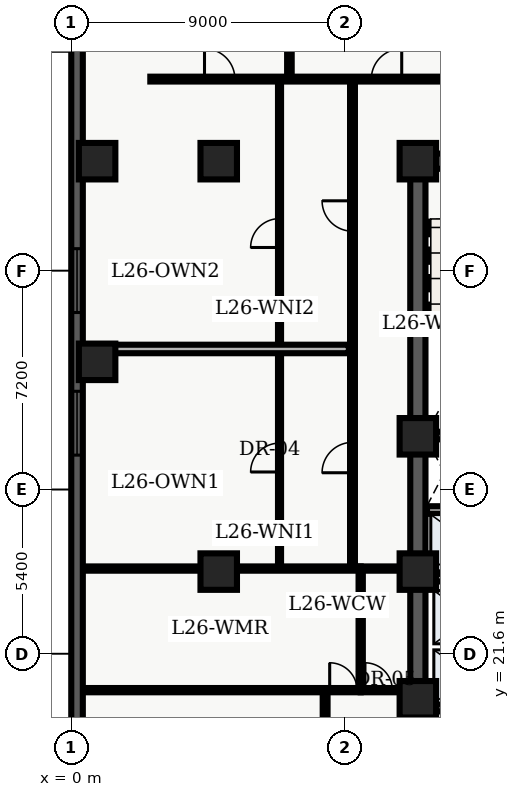
"""IFC4 building model, lengths in metres.
Left out: names, types, materials, properties, quantities, classifications, styles, units other than length and angle.
Written with IfcOpenShell. Run it as: python <this file> out.ifc"""

import sys

from ifc_helpers import new_model, entity, si_unit, converted_unit, direction, frame, origin_with_axes, origin_2d_with_axis, place, context, subcontext, project, spatial, polyline, rectangle, outline, extrude, element, fill, save


model = new_model("IFC4")
c1 = context("Model", 3, precision=1e-05, world=origin_with_axes(), true_north=direction((0.0, 1.0)))
c2 = subcontext(c1, "Body", "Model", "MODEL_VIEW")
j1 = project(units=[si_unit("LENGTHUNIT", "METRE"), converted_unit("PLANEANGLEUNIT", "DEGREE", entity("IfcPlaneAngleMeasure", 0.017), si_unit("PLANEANGLEUNIT", "RADIAN"), dimensions=[0, 0, 0, 0, 0, 0, 0])], contexts=[c1])
p1 = place(None, origin_with_axes())
s1 = spatial("IfcSite", under=j1, at=p1, CompositionType="ELEMENT")
p2 = place(p1, origin_with_axes())
s2 = spatial("IfcBuilding", under=s1, at=p2, CompositionType="ELEMENT")
p3 = place(p2, frame((0.0, 0.0, 108.6), z_axis=(0.0, 0.0, 1.0), x_axis=(1.0, 0.0, 0.0)))
s3 = spatial("IfcBuildingStorey", under=s2, at=p3, CompositionType="ELEMENT", Elevation=108.6)
p4 = place(p3, frame((11.4, 10.8, 0.0), z_axis=(0.0, 0.0, 1.0), x_axis=(0.0, 1.0, 0.0)))
e1 = element("IfcWall", 1, at=p4, inside=s3, PredefinedType="SHEAR", context=c2, shape_type="SweptSolid", body=[
    extrude(outline(polyline([(0.0, -0.25), (27.0, -0.25), (27.0, 0.25), (0.0, 0.25), (0.0, -0.25)])), origin_with_axes(), (0.0, 0.0, 1.0), 3.66),
])
p5 = place(p3, frame((11.4, 37.8, 0.0), z_axis=(0.0, 0.0, 1.0), x_axis=(1.0, 0.0, 0.0)))
e2 = element("IfcWall", 2, at=p5, inside=s3, PredefinedType="SHEAR", context=c2, shape_type="SweptSolid", body=[
    extrude(outline(polyline([(0.0, -0.25), (7.2, -0.25), (7.2, 0.25), (0.0, 0.25), (0.0, -0.25)])), origin_with_axes(), (0.0, 0.0, 1.0), 3.66),
])
p6 = place(p5, frame((2.625, 0.0, 0.0), z_axis=(0.0, 0.0, 1.0), x_axis=(1.0, 0.0, 0.0)))
e3 = element("IfcOpeningElement", 3, at=p6, cuts=e2, PredefinedType="OPENING", context=c2, shape_type="SweptSolid", body=[
    extrude(rectangle(XDim=1.05, YDim=0.52, at=origin_2d_with_axis()), origin_with_axes(), (0.0, 0.0, 1.0), 2.15),
])
for number, where, z_axis, x_axis in (
    (4, (11.65, 19.825, 0.0), (0.0, 0.0, 1.0), (1.0, 0.0, 0.0)),
    (5, (11.65, 28.775, 0.0), (0.0, 0.0, 1.0), (1.0, 0.0, 0.0)),
):
    element("IfcWall", number, at=place(p3, frame(where, z_axis=z_axis, x_axis=x_axis)), inside=s3, PredefinedType="SHEAR", context=c2, shape_type="SweptSolid", body=[
        extrude(outline(polyline([(0.0, -0.125), (6.7, -0.125), (6.7, 0.125), (0.0, 0.125), (0.0, -0.125)])), origin_with_axes(), (0.0, 0.0, 1.0), 3.66),
    ])
p7 = place(p3, frame((11.7, 24.1, 0.0), z_axis=(0.0, 0.0, 1.0), x_axis=(1.0, 0.0, 0.0)))
e6 = element("IfcWall", 6, at=p7, inside=s3, PredefinedType="SOLIDWALL", context=c2, shape_type="SweptSolid", body=[
    extrude(outline(polyline([(0.0, -0.125), (6.6, -0.125), (6.6, 0.125), (0.0, 0.125), (0.0, -0.125)])), origin_with_axes(), (0.0, 0.0, 1.0), 2.7),
])
p8 = place(p7, frame((3.6, 0.0, 0.0), z_axis=(0.0, 0.0, 1.0), x_axis=(1.0, 0.0, 0.0)))
e7 = element("IfcOpeningElement", 7, at=p8, cuts=e6, PredefinedType="OPENING", context=c2, shape_type="SweptSolid", body=[
    extrude(rectangle(XDim=0.9, YDim=0.27, at=origin_2d_with_axis()), origin_with_axes(), (0.0, 0.0, 1.0), 2.15),
])
p9 = place(p7, frame((5.65, 0.0, 0.0), z_axis=(0.0, 0.0, 1.0), x_axis=(1.0, 0.0, 0.0)))
e8 = element("IfcOpeningElement", 8, at=p9, cuts=e6, PredefinedType="OPENING", context=c2, shape_type="SweptSolid", body=[
    extrude(rectangle(XDim=0.9, YDim=0.27, at=origin_2d_with_axis()), origin_with_axes(), (0.0, 0.0, 1.0), 2.15),
])
p10 = place(p3, frame((11.7, 26.325, 0.0), z_axis=(0.0, 0.0, 1.0), x_axis=(1.0, 0.0, 0.0)))
e9 = element("IfcWall", 9, at=p10, inside=s3, PredefinedType="SOLIDWALL", context=c2, shape_type="SweptSolid", body=[
    extrude(outline(polyline([(0.0, -0.125), (6.6, -0.125), (6.6, 0.125), (0.0, 0.125), (0.0, -0.125)])), origin_with_axes(), (0.0, 0.0, 1.0), 2.7),
])
p11 = place(p10, frame((3.5, 0.0, 0.0), z_axis=(0.0, 0.0, 1.0), x_axis=(1.0, 0.0, 0.0)))
e10 = element("IfcOpeningElement", 10, at=p11, cuts=e9, PredefinedType="OPENING", context=c2, shape_type="SweptSolid", body=[
    extrude(rectangle(XDim=0.9, YDim=0.27, at=origin_2d_with_axis()), origin_with_axes(), (0.0, 0.0, 1.0), 2.15),
])
for number, where, z_axis, x_axis in (
    (11, (11.4, 20.1, 0.0), (0.0, 0.0, 1.0), (1.0, 0.0, 0.0)),
    (12, (11.4, 24.3, 0.0), (0.0, 0.0, 1.0), (1.0, 0.0, 0.0)),
    (13, (11.4, 28.75, 0.0), (0.0, 0.0, 1.0), (1.0, 0.0, 0.0)),
    (14, (11.4, 37.8, 0.0), (0.0, 0.0, 1.0), (1.0, 0.0, 0.0)),
    (15, (4.85, 24.3, 0.0), (0.0, 0.0, 1.0), (1.0, 0.0, 0.0)),
    (16, (4.85, 37.8, 0.0), (0.0, 0.0, 1.0), (1.0, 0.0, 0.0)),
    (17, (0.85, 31.2, 0.0), (0.0, 0.0, 1.0), (1.0, 0.0, 0.0)),
    (18, (0.85, 37.8, 0.0), (0.0, 0.0, 1.0), (1.0, 0.0, 0.0)),
):
    element("IfcColumn", number, at=place(p3, frame(where, z_axis=z_axis, x_axis=x_axis)), inside=s3, PredefinedType="COLUMN", context=c2, shape_type="SweptSolid", body=[
        extrude(rectangle(XDim=1.2, YDim=1.2, at=origin_2d_with_axis()), origin_with_axes(), (0.0, 0.0, 1.0), 3.9),
    ])
p12 = place(p3, frame((9.52, 20.4, 0.0), z_axis=(0.0, 0.0, 1.0), x_axis=(0.0, 1.0, 0.0)))
e19 = element("IfcWall", 19, at=p12, inside=s3, PredefinedType="PARTITIONING", context=c2, shape_type="SweptSolid", body=[
    extrude(outline(polyline([(0.0, -0.07), (4.0, -0.07), (4.0, 0.07), (0.0, 0.07), (0.0, -0.07)])), origin_with_axes(), (0.0, 0.0, 1.0), 2.7),
])
p13 = place(p3, frame((9.52, 20.4, 0.0), z_axis=(0.0, 0.0, 1.0), x_axis=(1.0, 0.0, 0.0)))
e20 = element("IfcWall", 20, at=p13, inside=s3, PredefinedType="PARTITIONING", context=c2, shape_type="SweptSolid", body=[
    extrude(outline(polyline([(0.0, -0.07), (1.58, -0.07), (1.58, 0.07), (0.0, 0.07), (0.0, -0.07)])), origin_with_axes(), (0.0, 0.0, 1.0), 2.7),
])
p14 = place(p13, frame((0.59, 0.0, 0.0), z_axis=(0.0, 0.0, 1.0), x_axis=(1.0, 0.0, 0.0)))
e21 = element("IfcOpeningElement", 21, at=p14, cuts=e20, PredefinedType="OPENING", context=c2, shape_type="SweptSolid", body=[
    extrude(rectangle(XDim=0.9, YDim=0.16, at=origin_2d_with_axis()), origin_with_axes(), (0.0, 0.0, 1.0), 2.15),
])
p15 = place(p3, frame((9.52, 24.4, 0.0), z_axis=(0.0, 0.0, 1.0), x_axis=(1.0, 0.0, 0.0)))
e22 = element("IfcWall", 22, at=p15, inside=s3, PredefinedType="PARTITIONING", context=c2, shape_type="SweptSolid", body=[
    extrude(outline(polyline([(0.0, -0.07), (1.58, -0.07), (1.58, 0.07), (0.0, 0.07), (0.0, -0.07)])), origin_with_axes(), (0.0, 0.0, 1.0), 2.7),
])
p16 = place(p3, frame((2.6, 40.5, 0.0), z_axis=(0.0, 0.0, 1.0), x_axis=(1.0, 0.0, 0.0)))
e23 = element("IfcWall", 23, at=p16, inside=s3, PredefinedType="PARTITIONING", context=c2, shape_type="SweptSolid", body=[
    extrude(outline(polyline([(0.0, -0.08), (18.65, -0.08), (18.65, 0.08), (0.0, 0.08), (0.0, -0.08)])), origin_with_axes(), (0.0, 0.0, 1.0), 2.7),
])
p17 = place(p16, frame((2.283, 0.0, 0.0), z_axis=(0.0, 0.0, 1.0), x_axis=(1.0, 0.0, 0.0)))
e24 = element("IfcOpeningElement", 24, at=p17, cuts=e23, PredefinedType="OPENING", context=c2, shape_type="SweptSolid", body=[
    extrude(rectangle(XDim=1.0, YDim=0.18, at=origin_2d_with_axis()), origin_with_axes(), (0.0, 0.0, 1.0), 2.15),
])
p18 = place(p16, frame((7.769, 0.0, 0.0), z_axis=(0.0, 0.0, 1.0), x_axis=(1.0, 0.0, 0.0)))
e25 = element("IfcOpeningElement", 25, at=p18, cuts=e23, PredefinedType="OPENING", context=c2, shape_type="SweptSolid", body=[
    extrude(rectangle(XDim=1.0, YDim=0.18, at=origin_2d_with_axis()), origin_with_axes(), (0.0, 0.0, 1.0), 2.15),
])
p19 = place(p16, frame((13.132, 0.0, 0.0), z_axis=(0.0, 0.0, 1.0), x_axis=(1.0, 0.0, 0.0)))
e26 = element("IfcOpeningElement", 26, at=p19, cuts=e23, PredefinedType="OPENING", context=c2, shape_type="SweptSolid", body=[
    extrude(rectangle(XDim=1.0, YDim=0.18, at=origin_2d_with_axis()), origin_with_axes(), (0.0, 0.0, 1.0), 2.15),
])
p20 = place(p3, frame((8.35, 7.8, 0.0), z_axis=(0.0, 0.0, 1.0), x_axis=(0.0, 1.0, 0.0)))
e27 = element("IfcWall", 27, at=p20, inside=s3, PredefinedType="PARTITIONING", context=c2, shape_type="SweptSolid", body=[
    extrude(outline(polyline([(0.0, -0.08), (12.6, -0.08), (12.6, 0.08), (0.0, 0.08), (0.0, -0.08)])), origin_with_axes(), (0.0, 0.0, 1.0), 2.7),
])
p21 = place(p20, frame((6.325, 0.0, 0.0), z_axis=(0.0, 0.0, 1.0), x_axis=(1.0, 0.0, 0.0)))
e28 = element("IfcOpeningElement", 28, at=p21, cuts=e27, PredefinedType="OPENING", context=c2, shape_type="SweptSolid", body=[
    extrude(rectangle(XDim=1.0, YDim=0.18, at=origin_2d_with_axis()), origin_with_axes(), (0.0, 0.0, 1.0), 2.15),
])
p22 = place(p3, frame((9.25, 24.4, 0.0), z_axis=(0.0, 0.0, 1.0), x_axis=(0.0, 1.0, 0.0)))
e29 = element("IfcWall", 29, at=p22, inside=s3, PredefinedType="PARTITIONING", context=c2, shape_type="SweptSolid", body=[
    extrude(outline(polyline([(0.0, -0.08), (16.1, -0.08), (16.1, 0.08), (0.0, 0.08), (0.0, -0.08)])), origin_with_axes(), (0.0, 0.0, 1.0), 2.7),
])
p23 = place(p22, frame((3.651, 0.0, 0.0), z_axis=(0.0, 0.0, 1.0), x_axis=(1.0, 0.0, 0.0)))
e30 = element("IfcOpeningElement", 30, at=p23, cuts=e29, PredefinedType="OPENING", context=c2, shape_type="SweptSolid", body=[
    extrude(rectangle(XDim=1.0, YDim=0.18, at=origin_2d_with_axis()), origin_with_axes(), (0.0, 0.0, 1.0), 2.15),
])
p24 = place(p22, frame((11.597, 0.0, 0.0), z_axis=(0.0, 0.0, 1.0), x_axis=(1.0, 0.0, 0.0)))
e31 = element("IfcOpeningElement", 31, at=p24, cuts=e29, PredefinedType="OPENING", context=c2, shape_type="SweptSolid", body=[
    extrude(rectangle(XDim=1.0, YDim=0.18, at=origin_2d_with_axis()), origin_with_axes(), (0.0, 0.0, 1.0), 2.15),
])
p25 = place(p3, frame((0.36, 20.4, 0.0), z_axis=(0.0, 0.0, 1.0), x_axis=(1.0, 0.0, 0.0)))
e32 = element("IfcWall", 32, at=p25, inside=s3, PredefinedType="PARTITIONING", context=c2, shape_type="SweptSolid", body=[
    extrude(outline(polyline([(0.0, -0.07), (9.16, -0.07), (9.16, 0.07), (0.0, 0.07), (0.0, -0.07)])), origin_with_axes(), (0.0, 0.0, 1.0), 2.7),
])
p26 = place(p25, frame((8.59, 0.0, 0.0), z_axis=(0.0, 0.0, 1.0), x_axis=(1.0, 0.0, 0.0)))
e33 = element("IfcOpeningElement", 33, at=p26, cuts=e32, PredefinedType="OPENING", context=c2, shape_type="SweptSolid", body=[
    extrude(rectangle(XDim=0.9, YDim=0.16, at=origin_2d_with_axis()), origin_with_axes(), (0.0, 0.0, 1.0), 2.15),
])
p27 = place(p3, frame((0.36, 24.4, 0.0), z_axis=(0.0, 0.0, 1.0), x_axis=(1.0, 0.0, 0.0)))
e34 = element("IfcWall", 34, at=p27, inside=s3, PredefinedType="PARTITIONING", context=c2, shape_type="SweptSolid", body=[
    extrude(outline(polyline([(0.0, -0.07), (9.16, -0.07), (9.16, 0.07), (0.0, 0.07), (0.0, -0.07)])), origin_with_axes(), (0.0, 0.0, 1.0), 2.7),
])
p28 = place(p3, frame((6.85, 24.55, 0.0), z_axis=(0.0, 0.0, 1.0), x_axis=(0.0, 1.0, 0.0)))
e35 = element("IfcWall", 35, at=p28, inside=s3, PredefinedType="PARTITIONING", context=c2, shape_type="SweptSolid", body=[
    extrude(outline(polyline([(0.0, -0.05), (15.75, -0.05), (15.75, 0.05), (0.0, 0.05), (0.0, -0.05)])), origin_with_axes(), (0.0, 0.0, 1.0), 2.7),
])
p29 = place(p28, frame((3.502, 0.0, 0.0), z_axis=(0.0, 0.0, 1.0), x_axis=(1.0, 0.0, 0.0)))
e36 = element("IfcOpeningElement", 36, at=p29, cuts=e35, PredefinedType="OPENING", context=c2, shape_type="SweptSolid", body=[
    extrude(rectangle(XDim=0.95, YDim=0.12, at=origin_2d_with_axis()), origin_with_axes(), (0.0, 0.0, 1.0), 2.15),
])
p30 = place(p28, frame((10.886, 0.0, 0.0), z_axis=(0.0, 0.0, 1.0), x_axis=(1.0, 0.0, 0.0)))
e37 = element("IfcOpeningElement", 37, at=p30, cuts=e35, PredefinedType="OPENING", context=c2, shape_type="SweptSolid", body=[
    extrude(rectangle(XDim=0.95, YDim=0.12, at=origin_2d_with_axis()), origin_with_axes(), (0.0, 0.0, 1.0), 2.15),
])
p31 = place(p3, frame((0.375, 31.623, 0.0), z_axis=(0.0, 0.0, 1.0), x_axis=(1.0, 0.0, 0.0)))
e38 = element("IfcWall", 38, at=p31, inside=s3, PredefinedType="PARTITIONING", context=c2, shape_type="SweptSolid", body=[
    extrude(outline(polyline([(0.0, -0.14), (8.755, -0.14), (8.755, 0.14), (0.0, 0.14), (0.0, -0.14)])), origin_with_axes(), (0.0, 0.0, 1.0), 2.7),
])
p32 = place(p3, frame((7.175, 40.6, 0.0), z_axis=(0.0, 0.0, 1.0), x_axis=(0.0, 1.0, 0.0)))
e39 = element("IfcWall", 39, at=p32, inside=s3, PredefinedType="PARTITIONING", context=c2, shape_type="SweptSolid", body=[
    extrude(outline(polyline([(0.0, -0.075), (7.64, -0.075), (7.64, 0.075), (0.0, 0.075), (0.0, -0.075)])), origin_with_axes(), (0.0, 0.0, 1.0), 2.7),
])
p33 = place(p3, frame((0.19, 2.78, 0.0), z_axis=(0.0, 0.0, 1.0), x_axis=(0.0, 1.0, 0.0)))
e40 = element("IfcWall", 40, at=p33, inside=s3, PredefinedType="SOLIDWALL", context=c2, shape_type="SweptSolid", body=[
    extrude(outline(polyline([(0.0, -0.19), (43.42, -0.19), (43.42, 0.19), (0.0, 0.19), (0.0, -0.19)])), origin_with_axes(), (0.0, 0.0, 1.0), 3.66),
])
p34 = place(p33, frame((2.946, 0.0, 0.45), z_axis=(0.0, 0.0, 1.0), x_axis=(1.0, 0.0, 0.0)))
e41 = element("IfcOpeningElement", 41, at=p34, cuts=e40, PredefinedType="OPENING", context=c2, shape_type="SweptSolid", body=[
    extrude(rectangle(XDim=2.1, YDim=0.4, at=origin_2d_with_axis()), origin_with_axes(), (0.0, 0.0, 1.0), 2.2),
])
p35 = place(p33, frame((12.328, 0.0, 0.45), z_axis=(0.0, 0.0, 1.0), x_axis=(1.0, 0.0, 0.0)))
e42 = element("IfcOpeningElement", 42, at=p35, cuts=e40, PredefinedType="OPENING", context=c2, shape_type="SweptSolid", body=[
    extrude(rectangle(XDim=2.1, YDim=0.4, at=origin_2d_with_axis()), origin_with_axes(), (0.0, 0.0, 1.0), 2.2),
])
p36 = place(p33, frame((26.401, 0.0, 0.45), z_axis=(0.0, 0.0, 1.0), x_axis=(1.0, 0.0, 0.0)))
e43 = element("IfcOpeningElement", 43, at=p36, cuts=e40, PredefinedType="OPENING", context=c2, shape_type="SweptSolid", body=[
    extrude(rectangle(XDim=2.1, YDim=0.4, at=origin_2d_with_axis()), origin_with_axes(), (0.0, 0.0, 1.0), 2.2),
])
p37 = place(p33, frame((31.092, 0.0, 0.45), z_axis=(0.0, 0.0, 1.0), x_axis=(1.0, 0.0, 0.0)))
e44 = element("IfcOpeningElement", 44, at=p37, cuts=e40, PredefinedType="OPENING", context=c2, shape_type="SweptSolid", body=[
    extrude(rectangle(XDim=2.1, YDim=0.4, at=origin_2d_with_axis()), origin_with_axes(), (0.0, 0.0, 1.0), 2.2),
])
p38 = place(p33, frame((40.024, 0.0, 0.45), z_axis=(0.0, 0.0, 1.0), x_axis=(1.0, 0.0, 0.0)))
e45 = element("IfcOpeningElement", 45, at=p38, cuts=e40, PredefinedType="OPENING", context=c2, shape_type="SweptSolid", body=[
    extrude(rectangle(XDim=2.1, YDim=0.4, at=origin_2d_with_axis()), origin_with_axes(), (0.0, 0.0, 1.0), 2.2),
])
p39 = place(p13, frame((0.59, 0.0, 0.0), z_axis=(0.0, 0.0, 1.0), x_axis=(1.0, 0.0, 0.0)))
e46 = element("IfcDoor", 46, at=p39, inside=s3, OperationType="SINGLE_SWING_LEFT", PredefinedType="DOOR", context=c2, shape_type="SweptSolid", body=[
    extrude(rectangle(XDim=0.9, YDim=0.084, at=origin_2d_with_axis()), origin_with_axes(), (0.0, 0.0, 1.0), 2.15),
])
fill(e21, e46)
p40 = place(p25, frame((8.59, 0.0, 0.0), z_axis=(0.0, 0.0, 1.0), x_axis=(1.0, 0.0, 0.0)))
e47 = element("IfcDoor", 47, at=p40, inside=s3, OperationType="SINGLE_SWING_LEFT", PredefinedType="DOOR", context=c2, shape_type="SweptSolid", body=[
    extrude(rectangle(XDim=0.9, YDim=0.084, at=origin_2d_with_axis()), origin_with_axes(), (0.0, 0.0, 1.0), 2.15),
])
fill(e33, e47)
p41 = place(p28, frame((3.502, 0.0, 0.0), z_axis=(0.0, 0.0, 1.0), x_axis=(1.0, 0.0, 0.0)))
e48 = element("IfcDoor", 48, at=p41, inside=s3, OperationType="SINGLE_SWING_LEFT", PredefinedType="DOOR", context=c2, shape_type="SweptSolid", body=[
    extrude(rectangle(XDim=0.95, YDim=0.06, at=origin_2d_with_axis()), origin_with_axes(), (0.0, 0.0, 1.0), 2.15),
])
fill(e36, e48)
p42 = place(p22, frame((3.651, 0.0, 0.0), z_axis=(0.0, 0.0, 1.0), x_axis=(1.0, 0.0, 0.0)))
e49 = element("IfcDoor", 49, at=p42, inside=s3, OperationType="SINGLE_SWING_LEFT", PredefinedType="DOOR", context=c2, shape_type="SweptSolid", body=[
    extrude(rectangle(XDim=1.0, YDim=0.09, at=origin_2d_with_axis()), origin_with_axes(), (0.0, 0.0, 1.0), 2.15),
])
fill(e30, e49)
p43 = place(p28, frame((10.886, 0.0, 0.0), z_axis=(0.0, 0.0, 1.0), x_axis=(1.0, 0.0, 0.0)))
e50 = element("IfcDoor", 50, at=p43, inside=s3, OperationType="SINGLE_SWING_LEFT", PredefinedType="DOOR", context=c2, shape_type="SweptSolid", body=[
    extrude(rectangle(XDim=0.95, YDim=0.06, at=origin_2d_with_axis()), origin_with_axes(), (0.0, 0.0, 1.0), 2.15),
])
fill(e37, e50)
p44 = place(p22, frame((11.597, 0.0, 0.0), z_axis=(0.0, 0.0, 1.0), x_axis=(1.0, 0.0, 0.0)))
e51 = element("IfcDoor", 51, at=p44, inside=s3, OperationType="SINGLE_SWING_RIGHT", PredefinedType="DOOR", context=c2, shape_type="SweptSolid", body=[
    extrude(rectangle(XDim=1.0, YDim=0.09, at=origin_2d_with_axis()), origin_with_axes(), (0.0, 0.0, 1.0), 2.15),
])
fill(e31, e51)
p45 = place(p16, frame((2.283, 0.0, 0.0), z_axis=(0.0, 0.0, 1.0), x_axis=(1.0, 0.0, 0.0)))
e52 = element("IfcDoor", 52, at=p45, inside=s3, OperationType="SINGLE_SWING_LEFT", PredefinedType="DOOR", context=c2, shape_type="SweptSolid", body=[
    extrude(rectangle(XDim=1.0, YDim=0.09, at=origin_2d_with_axis()), origin_with_axes(), (0.0, 0.0, 1.0), 2.15),
])
fill(e24, e52)
p46 = place(p16, frame((7.769, 0.0, 0.0), z_axis=(0.0, 0.0, 1.0), x_axis=(1.0, 0.0, 0.0)))
e53 = element("IfcDoor", 53, at=p46, inside=s3, OperationType="SINGLE_SWING_RIGHT", PredefinedType="DOOR", context=c2, shape_type="SweptSolid", body=[
    extrude(rectangle(XDim=1.0, YDim=0.09, at=origin_2d_with_axis()), origin_with_axes(), (0.0, 0.0, 1.0), 2.15),
])
fill(e25, e53)
p47 = place(p33, frame((26.401, 0.0, 0.45), z_axis=(0.0, 0.0, 1.0), x_axis=(1.0, 0.0, 0.0)))
e54 = element("IfcWindow", 54, at=p47, inside=s3, PredefinedType="WINDOW", context=c2, shape_type="SweptSolid", body=[
    extrude(rectangle(XDim=2.1, YDim=0.09, at=origin_2d_with_axis()), origin_with_axes(), (0.0, 0.0, 1.0), 2.2),
])
fill(e43, e54)
p48 = place(p33, frame((31.092, 0.0, 0.45), z_axis=(0.0, 0.0, 1.0), x_axis=(1.0, 0.0, 0.0)))
e55 = element("IfcWindow", 55, at=p48, inside=s3, PredefinedType="WINDOW", context=c2, shape_type="SweptSolid", body=[
    extrude(rectangle(XDim=2.1, YDim=0.09, at=origin_2d_with_axis()), origin_with_axes(), (0.0, 0.0, 1.0), 2.2),
])
fill(e44, e55)
save(model, sys.argv[1])
